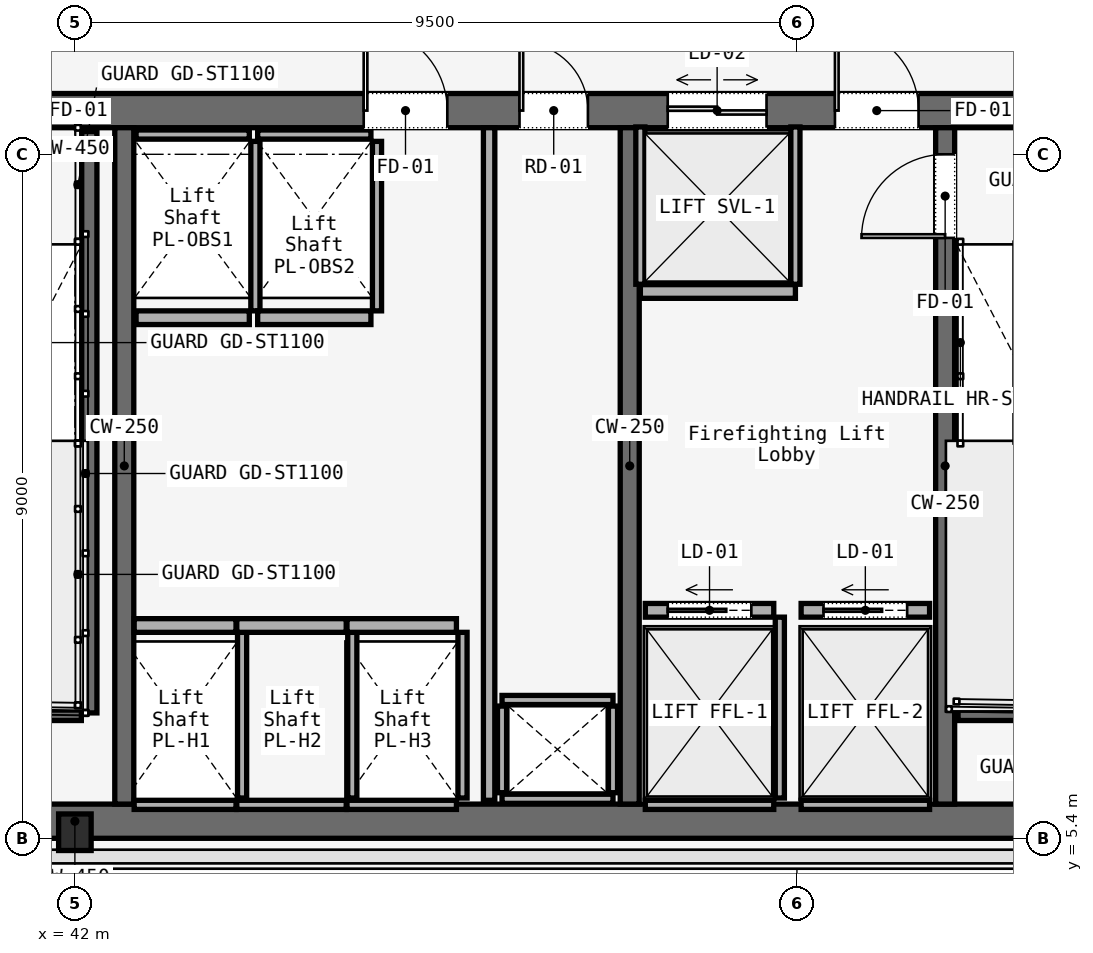
"""IFC4 building model, lengths in metres.
Left out: names, types, materials, properties, quantities, classifications, styles, units other than length and angle.
Written with IfcOpenShell. Run it as: python <this file> out.ifc"""

import sys

from ifc_helpers import new_model, si_unit, direction, frame, frame_2d, origin, origin_2d, place, context, subcontext, project, spatial, rectangle, i_section, extrude, element, fill, save


model = new_model("IFC4")
c1 = context("Model", 3, precision=1e-05, world=origin(), true_north=direction((0.0, 1.0)))
c2 = subcontext(c1, "Body", "Model", "MODEL_VIEW")
j1 = project(units=[si_unit("LENGTHUNIT", "METRE"), si_unit("PLANEANGLEUNIT", "RADIAN")], contexts=[c1])
p1 = place(None, origin())
s1 = spatial("IfcSite", under=j1, at=p1, CompositionType="ELEMENT")
p2 = place(p1, origin())
s2 = spatial("IfcBuilding", under=s1, at=p2, CompositionType="ELEMENT")
p3 = place(p2, frame((0.0, 0.0, 157.4)))
s3 = spatial("IfcBuildingStorey", under=s2, at=p3, CompositionType="ELEMENT", Elevation=157.4)
p4 = place(p3, frame((26.45, 14.975, 0.0), z_axis=(0.0, 0.0, 1.0), x_axis=(1.0, 0.0, 0.0)))
e1 = element("IfcWall", 1, at=p4, inside=s3, PredefinedType="SOLIDWALL", context=c2, shape_type="SweptSolid", body=[
    extrude(rectangle(XDim=31.1, YDim=0.45, at=frame_2d((15.55, 0.0))), origin(), (0.0, 0.0, 1.0), 3.58),
])
p5 = place(p4, frame((1.65, 0.0, 0.0)))
e2 = element("IfcOpeningElement", 2, at=p5, cuts=e1, PredefinedType="OPENING", context=c2, shape_type="SweptSolid", body=[
    extrude(rectangle(XDim=1.1, YDim=2.2, at=frame_2d((0.55, 1.1))), frame((0.0, 0.225, 0.0), z_axis=(0.0, -1.0, 0.0), x_axis=(1.0, 0.0, 0.0)), (0.0, 0.0, 1.0), 0.45),
])
p6 = place(p4, frame((13.65, 0.0, 0.0)))
e3 = element("IfcOpeningElement", 3, at=p6, cuts=e1, PredefinedType="OPENING", context=c2, shape_type="SweptSolid", body=[
    extrude(rectangle(XDim=1.1, YDim=2.2, at=frame_2d((0.55, 1.1))), frame((0.0, 0.225, 0.0), z_axis=(0.0, -1.0, 0.0), x_axis=(1.0, 0.0, 0.0)), (0.0, 0.0, 1.0), 0.45),
])
p7 = place(p4, frame((25.55, 0.0, 0.0)))
e4 = element("IfcOpeningElement", 4, at=p7, cuts=e1, PredefinedType="OPENING", context=c2, shape_type="SweptSolid", body=[
    extrude(rectangle(XDim=1.1, YDim=2.2, at=frame_2d((0.55, 1.1))), frame((0.0, 0.225, 0.0), z_axis=(0.0, -1.0, 0.0), x_axis=(1.0, 0.0, 0.0)), (0.0, 0.0, 1.0), 0.45),
])
p8 = place(p4, frame((10.7, 0.0, 0.0)))
e5 = element("IfcOpeningElement", 5, at=p8, cuts=e1, PredefinedType="OPENING", context=c2, shape_type="SweptSolid", body=[
    extrude(rectangle(XDim=1.4, YDim=2.2, at=frame_2d((0.7, 1.1))), frame((0.0, 0.225, 0.0), z_axis=(0.0, -1.0, 0.0), x_axis=(1.0, 0.0, 0.0)), (0.0, 0.0, 1.0), 0.45),
])
p9 = place(p4, frame((19.35, 0.0, 0.0)))
e6 = element("IfcOpeningElement", 6, at=p9, cuts=e1, PredefinedType="OPENING", context=c2, shape_type="SweptSolid", body=[
    extrude(rectangle(XDim=1.1, YDim=2.2, at=frame_2d((0.55, 1.1))), frame((0.0, 0.225, 0.0), z_axis=(0.0, -1.0, 0.0), x_axis=(1.0, 0.0, 0.0)), (0.0, 0.0, 1.0), 0.45),
])
p10 = place(p4, frame((21.4, 0.0, 0.0)))
e7 = element("IfcOpeningElement", 7, at=p10, cuts=e1, PredefinedType="OPENING", context=c2, shape_type="SweptSolid", body=[
    extrude(rectangle(XDim=0.9, YDim=2.1, at=frame_2d((0.45, 1.05))), frame((0.0, 0.225, 0.0), z_axis=(0.0, -1.0, 0.0), x_axis=(1.0, 0.0, 0.0)), (0.0, 0.0, 1.0), 0.45),
])
p11 = place(p4, frame((23.35, 0.0, 0.0)))
e8 = element("IfcOpeningElement", 8, at=p11, cuts=e1, PredefinedType="OPENING", context=c2, shape_type="SweptSolid", body=[
    extrude(rectangle(XDim=1.3, YDim=2.3, at=frame_2d((0.65, 1.15))), frame((0.0, 0.225, 0.0), z_axis=(0.0, -1.0, 0.0), x_axis=(1.0, 0.0, 0.0)), (0.0, 0.0, 1.0), 0.45),
])
p12 = place(p3, frame((26.45, 5.625, 0.0), z_axis=(0.0, 0.0, 1.0), x_axis=(1.0, 0.0, 0.0)))
e9 = element("IfcWall", 9, at=p12, inside=s3, PredefinedType="SOLIDWALL", context=c2, shape_type="SweptSolid", body=[
    extrude(rectangle(XDim=31.1, YDim=0.45, at=frame_2d((15.55, 0.0))), origin(), (0.0, 0.0, 1.0), 3.58),
])
for number, where, z_axis, x_axis in (
    (10, (42.65, 5.85, 0.0), (0.0, 0.0, 1.0), (0.0, 1.0, 0.0)),
    (11, (49.3, 5.85, 0.0), (0.0, 0.0, 1.0), (0.0, 1.0, 0.0)),
):
    element("IfcWall", number, at=place(p3, frame(where, z_axis=z_axis, x_axis=x_axis)), inside=s3, PredefinedType="SOLIDWALL", context=c2, shape_type="SweptSolid", body=[
        extrude(rectangle(XDim=8.9, YDim=0.25, at=frame_2d((4.45, 0.0))), origin(), (0.0, 0.0, 1.0), 3.58),
    ])
p13 = place(p3, frame((53.45, 5.85, 0.0), z_axis=(0.0, 0.0, 1.0), x_axis=(0.0, 1.0, 0.0)))
e12 = element("IfcWall", 12, at=p13, inside=s3, PredefinedType="SOLIDWALL", context=c2, shape_type="SweptSolid", body=[
    extrude(rectangle(XDim=8.9, YDim=0.25, at=frame_2d((4.45, 0.0))), origin(), (0.0, 0.0, 1.0), 3.58),
])
p14 = place(p13, frame((7.45, 0.0, 0.0)))
e13 = element("IfcOpeningElement", 13, at=p14, cuts=e12, PredefinedType="OPENING", context=c2, shape_type="SweptSolid", body=[
    extrude(rectangle(XDim=1.1, YDim=2.2, at=frame_2d((0.55, 1.1))), frame((0.0, 0.125, 0.0), z_axis=(0.0, -1.0, 0.0), x_axis=(1.0, 0.0, 0.0)), (0.0, 0.0, 1.0), 0.25),
])
p15 = place(p3, frame((42.0, 5.48, 0.0), z_axis=(0.0, 0.0, 1.0), x_axis=(1.0, 0.0, 0.0)))
e14 = element("IfcColumn", 14, at=p15, inside=s3, PredefinedType="COLUMN", context=c2, shape_type="SweptSolid", body=[
    extrude(i_section(OverallWidth=0.428, OverallDepth=0.481, WebThickness=0.051, FlangeThickness=0.065, FilletRadius=0.015, at=origin_2d()), origin(), (0.0, 0.0, 1.0), 3.58),
])
p16 = place(p3, frame((42.19, 14.7, 0.0), z_axis=(0.0, 0.0, 1.0), x_axis=(0.0, -1.0, 0.0)))
e15 = element("IfcWall", 15, at=p16, inside=s3, PredefinedType="SOLIDWALL", context=c2, shape_type="SweptSolid", body=[
    extrude(rectangle(XDim=7.65, YDim=0.2, at=frame_2d((3.825, 0.0))), origin(), (0.0, 0.0, 1.0), 3.8),
])
for number, where, z_axis, x_axis in (
    (16, (38.97, 7.05, 0.0), (0.0, 0.0, 1.0), (1.0, 0.0, 0.0)),
    (17, (53.62, 7.05, 0.0), (0.0, 0.0, 1.0), (1.0, 0.0, 0.0)),
):
    element("IfcWall", number, at=place(p3, frame(where, z_axis=z_axis, x_axis=x_axis)), inside=s3, PredefinedType="SOLIDWALL", context=c2, shape_type="SweptSolid", body=[
        extrude(rectangle(XDim=3.115, YDim=0.2, at=frame_2d((1.558, 0.0))), origin(), (0.0, 0.0, 1.0), 3.8),
    ])
for number, where, z_axis, x_axis in (
    (18, (47.62, 5.92, 0.0), (0.0, 0.0, 1.0), (1.0, 0.0, 0.0)),
    (19, (47.62, 7.22, 0.0), (0.0, 0.0, 1.0), (1.0, 0.0, 0.0)),
):
    element("IfcWall", number, at=place(p3, frame(where, z_axis=z_axis, x_axis=x_axis)), inside=s3, PredefinedType="SOLIDWALL", context=c2, shape_type="SweptSolid", body=[
        extrude(rectangle(XDim=1.46, YDim=0.12, at=frame_2d((0.73, 0.0))), origin(), (0.0, 0.0, 1.0), 3.01),
    ])
for number, where, z_axis, x_axis in (
    (20, (47.62, 6.0, 0.0), (0.0, 0.0, 1.0), (0.0, 1.0, 0.0)),
    (21, (49.08, 6.0, 0.0), (0.0, 0.0, 1.0), (0.0, 1.0, 0.0)),
):
    element("IfcWall", number, at=place(p3, frame(where, z_axis=z_axis, x_axis=x_axis)), inside=s3, PredefinedType="SOLIDWALL", context=c2, shape_type="SweptSolid", body=[
        extrude(rectangle(XDim=1.14, YDim=0.12, at=frame_2d((0.57, 0.0))), origin(), (0.0, 0.0, 1.0), 3.01),
    ])
p17 = place(p3, frame((47.45, 5.9, 0.0), z_axis=(0.0, 0.0, 1.0), x_axis=(0.0, 1.0, 0.0)))
e22 = element("IfcWall", 22, at=p17, inside=s3, PredefinedType="PARTITIONING", context=c2, shape_type="SweptSolid", body=[
    extrude(rectangle(XDim=8.85, YDim=0.15, at=frame_2d((4.425, 0.0))), origin(), (0.0, 0.0, 1.0), 3.01),
])
p18 = place(p3, frame((42.78, 8.2, 0.0), z_axis=(0.0, 0.0, 1.0), x_axis=(1.0, 0.0, 0.0)))
e23 = element("IfcWall", 23, at=p18, inside=s3, PredefinedType="SOLIDWALL", context=c2, shape_type="SweptSolid", body=[
    extrude(rectangle(XDim=1.34, YDim=0.18, at=frame_2d((0.67, 0.0))), origin(), (0.0, 0.0, 1.0), 3.01),
])
p19 = place(p3, frame((42.78, 5.84, 0.0), z_axis=(0.0, 0.0, 1.0), x_axis=(1.0, 0.0, 0.0)))
e24 = element("IfcWall", 24, at=p19, inside=s3, PredefinedType="SOLIDWALL", context=c2, shape_type="SweptSolid", body=[
    extrude(rectangle(XDim=1.34, YDim=0.12, at=frame_2d((0.67, 0.0))), origin(), (0.0, 0.0, 1.0), 3.01),
])
p20 = place(p3, frame((44.2, 5.93, 0.0), z_axis=(0.0, 0.0, 1.0), x_axis=(0.0, 1.0, 0.0)))
e25 = element("IfcWall", 25, at=p20, inside=s3, PredefinedType="SOLIDWALL", context=c2, shape_type="SweptSolid", body=[
    extrude(rectangle(XDim=2.18, YDim=0.12, at=frame_2d((1.09, 0.0))), origin(), (0.0, 0.0, 1.0), 3.01),
])
p21 = place(p3, frame((44.13, 8.2, 0.0), z_axis=(0.0, 0.0, 1.0), x_axis=(1.0, 0.0, 0.0)))
e26 = element("IfcWall", 26, at=p21, inside=s3, PredefinedType="SOLIDWALL", context=c2, shape_type="SweptSolid", body=[
    extrude(rectangle(XDim=1.44, YDim=0.18, at=frame_2d((0.72, 0.0))), origin(), (0.0, 0.0, 1.0), 3.01),
])
p22 = place(p3, frame((44.13, 5.84, 0.0), z_axis=(0.0, 0.0, 1.0), x_axis=(1.0, 0.0, 0.0)))
e27 = element("IfcWall", 27, at=p22, inside=s3, PredefinedType="SOLIDWALL", context=c2, shape_type="SweptSolid", body=[
    extrude(rectangle(XDim=1.44, YDim=0.12, at=frame_2d((0.72, 0.0))), origin(), (0.0, 0.0, 1.0), 3.01),
])
p23 = place(p3, frame((45.65, 5.93, 0.0), z_axis=(0.0, 0.0, 1.0), x_axis=(0.0, 1.0, 0.0)))
e28 = element("IfcWall", 28, at=p23, inside=s3, PredefinedType="SOLIDWALL", context=c2, shape_type="SweptSolid", body=[
    extrude(rectangle(XDim=2.18, YDim=0.12, at=frame_2d((1.09, 0.0))), origin(), (0.0, 0.0, 1.0), 3.01),
])
p24 = place(p3, frame((45.58, 8.2, 0.0), z_axis=(0.0, 0.0, 1.0), x_axis=(1.0, 0.0, 0.0)))
e29 = element("IfcWall", 29, at=p24, inside=s3, PredefinedType="SOLIDWALL", context=c2, shape_type="SweptSolid", body=[
    extrude(rectangle(XDim=1.44, YDim=0.18, at=frame_2d((0.72, 0.0))), origin(), (0.0, 0.0, 1.0), 3.01),
])
p25 = place(p3, frame((45.58, 5.84, 0.0), z_axis=(0.0, 0.0, 1.0), x_axis=(1.0, 0.0, 0.0)))
e30 = element("IfcWall", 30, at=p25, inside=s3, PredefinedType="SOLIDWALL", context=c2, shape_type="SweptSolid", body=[
    extrude(rectangle(XDim=1.44, YDim=0.12, at=frame_2d((0.72, 0.0))), origin(), (0.0, 0.0, 1.0), 3.01),
])
p26 = place(p3, frame((47.1, 5.93, 0.0), z_axis=(0.0, 0.0, 1.0), x_axis=(0.0, 1.0, 0.0)))
e31 = element("IfcWall", 31, at=p26, inside=s3, PredefinedType="SOLIDWALL", context=c2, shape_type="SweptSolid", body=[
    extrude(rectangle(XDim=2.18, YDim=0.12, at=frame_2d((1.09, 0.0))), origin(), (0.0, 0.0, 1.0), 3.01),
])
p27 = place(p3, frame((42.805, 12.25, 0.0), z_axis=(0.0, 0.0, 1.0), x_axis=(1.0, 0.0, 0.0)))
e32 = element("IfcWall", 32, at=p27, inside=s3, PredefinedType="SOLIDWALL", context=c2, shape_type="SweptSolid", body=[
    extrude(rectangle(XDim=1.49, YDim=0.18, at=frame_2d((0.745, 0.0))), origin(), (0.0, 0.0, 1.0), 3.01),
])
p28 = place(p3, frame((42.805, 14.66, 0.0), z_axis=(0.0, 0.0, 1.0), x_axis=(1.0, 0.0, 0.0)))
e33 = element("IfcWall", 33, at=p28, inside=s3, PredefinedType="SOLIDWALL", context=c2, shape_type="SweptSolid", body=[
    extrude(rectangle(XDim=1.49, YDim=0.12, at=frame_2d((0.745, 0.0))), origin(), (0.0, 0.0, 1.0), 3.01),
])
p29 = place(p3, frame((44.375, 12.34, 0.0), z_axis=(0.0, 0.0, 1.0), x_axis=(0.0, 1.0, 0.0)))
e34 = element("IfcWall", 34, at=p29, inside=s3, PredefinedType="SOLIDWALL", context=c2, shape_type="SweptSolid", body=[
    extrude(rectangle(XDim=2.23, YDim=0.12, at=frame_2d((1.115, 0.0))), origin(), (0.0, 0.0, 1.0), 3.01),
])
p30 = place(p3, frame((44.405, 12.25, 0.0), z_axis=(0.0, 0.0, 1.0), x_axis=(1.0, 0.0, 0.0)))
e35 = element("IfcWall", 35, at=p30, inside=s3, PredefinedType="SOLIDWALL", context=c2, shape_type="SweptSolid", body=[
    extrude(rectangle(XDim=1.49, YDim=0.18, at=frame_2d((0.745, 0.0))), origin(), (0.0, 0.0, 1.0), 3.01),
])
p31 = place(p3, frame((44.405, 14.66, 0.0), z_axis=(0.0, 0.0, 1.0), x_axis=(1.0, 0.0, 0.0)))
e36 = element("IfcWall", 36, at=p31, inside=s3, PredefinedType="SOLIDWALL", context=c2, shape_type="SweptSolid", body=[
    extrude(rectangle(XDim=1.49, YDim=0.12, at=frame_2d((0.745, 0.0))), origin(), (0.0, 0.0, 1.0), 3.01),
])
p32 = place(p3, frame((45.975, 12.34, 0.0), z_axis=(0.0, 0.0, 1.0), x_axis=(0.0, 1.0, 0.0)))
e37 = element("IfcWall", 37, at=p32, inside=s3, PredefinedType="SOLIDWALL", context=c2, shape_type="SweptSolid", body=[
    extrude(rectangle(XDim=2.23, YDim=0.12, at=frame_2d((1.115, 0.0))), origin(), (0.0, 0.0, 1.0), 3.01),
])
p33 = place(p3, frame((49.505, 8.4, 0.0), z_axis=(0.0, 0.0, 1.0), x_axis=(1.0, 0.0, 0.0)))
e38 = element("IfcWall", 38, at=p33, inside=s3, PredefinedType="SOLIDWALL", context=c2, shape_type="SweptSolid", body=[
    extrude(rectangle(XDim=1.69, YDim=0.18, at=frame_2d((0.845, 0.0))), origin(), (0.0, 0.0, 1.0), 3.01),
])
p34 = place(p33, frame((0.295, 0.0, 0.0)))
e39 = element("IfcOpeningElement", 39, at=p34, cuts=e38, PredefinedType="OPENING", context=c2, shape_type="SweptSolid", body=[
    extrude(rectangle(XDim=1.1, YDim=2.2, at=frame_2d((0.55, 1.1))), frame((0.0, 0.09, 0.0), z_axis=(0.0, -1.0, 0.0), x_axis=(1.0, 0.0, 0.0)), (0.0, 0.0, 1.0), 0.18),
])
p35 = place(p3, frame((49.505, 5.84, 0.0), z_axis=(0.0, 0.0, 1.0), x_axis=(1.0, 0.0, 0.0)))
e40 = element("IfcWall", 40, at=p35, inside=s3, PredefinedType="SOLIDWALL", context=c2, shape_type="SweptSolid", body=[
    extrude(rectangle(XDim=1.69, YDim=0.12, at=frame_2d((0.845, 0.0))), origin(), (0.0, 0.0, 1.0), 3.01),
])
p36 = place(p3, frame((51.275, 5.93, 0.0), z_axis=(0.0, 0.0, 1.0), x_axis=(0.0, 1.0, 0.0)))
e41 = element("IfcWall", 41, at=p36, inside=s3, PredefinedType="SOLIDWALL", context=c2, shape_type="SweptSolid", body=[
    extrude(rectangle(XDim=2.38, YDim=0.12, at=frame_2d((1.19, 0.0))), origin(), (0.0, 0.0, 1.0), 3.01),
])
p37 = place(p3, frame((51.555, 8.4, 0.0), z_axis=(0.0, 0.0, 1.0), x_axis=(1.0, 0.0, 0.0)))
e42 = element("IfcWall", 42, at=p37, inside=s3, PredefinedType="SOLIDWALL", context=c2, shape_type="SweptSolid", body=[
    extrude(rectangle(XDim=1.69, YDim=0.18, at=frame_2d((0.845, 0.0))), origin(), (0.0, 0.0, 1.0), 3.01),
])
p38 = place(p37, frame((0.295, 0.0, 0.0)))
e43 = element("IfcOpeningElement", 43, at=p38, cuts=e42, PredefinedType="OPENING", context=c2, shape_type="SweptSolid", body=[
    extrude(rectangle(XDim=1.1, YDim=2.2, at=frame_2d((0.55, 1.1))), frame((0.0, 0.09, 0.0), z_axis=(0.0, -1.0, 0.0), x_axis=(1.0, 0.0, 0.0)), (0.0, 0.0, 1.0), 0.18),
])
p39 = place(p3, frame((51.555, 5.84, 0.0), z_axis=(0.0, 0.0, 1.0), x_axis=(1.0, 0.0, 0.0)))
e44 = element("IfcWall", 44, at=p39, inside=s3, PredefinedType="SOLIDWALL", context=c2, shape_type="SweptSolid", body=[
    extrude(rectangle(XDim=1.69, YDim=0.12, at=frame_2d((0.845, 0.0))), origin(), (0.0, 0.0, 1.0), 3.01),
])
p40 = place(p3, frame((49.44, 12.595, 0.0), z_axis=(0.0, 0.0, 1.0), x_axis=(1.0, 0.0, 0.0)))
e45 = element("IfcWall", 45, at=p40, inside=s3, PredefinedType="SOLIDWALL", context=c2, shape_type="SweptSolid", body=[
    extrude(rectangle(XDim=2.04, YDim=0.18, at=frame_2d((1.02, 0.0))), origin(), (0.0, 0.0, 1.0), 3.01),
])
for number, where, z_axis, x_axis in (
    (46, (49.44, 12.69, 0.0), (0.0, 0.0, 1.0), (0.0, 1.0, 0.0)),
    (47, (51.48, 12.69, 0.0), (0.0, 0.0, 1.0), (0.0, 1.0, 0.0)),
):
    element("IfcWall", number, at=place(p3, frame(where, z_axis=z_axis, x_axis=x_axis)), inside=s3, PredefinedType="SOLIDWALL", context=c2, shape_type="SweptSolid", body=[
        extrude(rectangle(XDim=2.07, YDim=0.12, at=frame_2d((1.035, 0.0))), origin(), (0.0, 0.0, 1.0), 3.01),
    ])
p41 = place(p7, origin())
e48 = element("IfcDoor", 48, at=p41, inside=s3, OperationType="SINGLE_SWING_RIGHT", PredefinedType="DOOR", context=c2, shape_type="SweptSolid", body=[
    extrude(rectangle(XDim=1.1, YDim=2.2, at=frame_2d((0.55, 1.1))), frame((0.0, 0.025, 0.0), z_axis=(0.0, -1.0, 0.0), x_axis=(1.0, 0.0, 0.0)), (0.0, 0.0, 1.0), 0.05),
])
fill(e4, e48)
p42 = place(p9, origin())
e49 = element("IfcDoor", 49, at=p42, inside=s3, OperationType="SINGLE_SWING_LEFT", PredefinedType="DOOR", context=c2, shape_type="SweptSolid", body=[
    extrude(rectangle(XDim=1.1, YDim=2.2, at=frame_2d((0.55, 1.1))), frame((0.0, 0.025, 0.0), z_axis=(0.0, -1.0, 0.0), x_axis=(1.0, 0.0, 0.0)), (0.0, 0.0, 1.0), 0.05),
])
fill(e6, e49)
p43 = place(p10, origin())
e50 = element("IfcDoor", 50, at=p43, inside=s3, OperationType="SINGLE_SWING_LEFT", PredefinedType="DOOR", context=c2, shape_type="SweptSolid", body=[
    extrude(rectangle(XDim=0.9, YDim=2.1, at=frame_2d((0.45, 1.05))), frame((0.0, 0.025, 0.0), z_axis=(0.0, -1.0, 0.0), x_axis=(1.0, 0.0, 0.0)), (0.0, 0.0, 1.0), 0.05),
])
fill(e7, e50)
p44 = place(p14, origin())
e51 = element("IfcDoor", 51, at=p44, inside=s3, OperationType="SINGLE_SWING_LEFT", PredefinedType="DOOR", context=c2, shape_type="SweptSolid", body=[
    extrude(rectangle(XDim=1.1, YDim=2.2, at=frame_2d((0.55, 1.1))), frame((0.0, 0.025, 0.0), z_axis=(0.0, -1.0, 0.0), x_axis=(1.0, 0.0, 0.0)), (0.0, 0.0, 1.0), 0.05),
])
fill(e13, e51)
p45 = place(p34, origin())
e52 = element("IfcDoor", 52, at=p45, inside=s3, OperationType="SLIDING_TO_LEFT", PredefinedType="DOOR", context=c2, shape_type="SweptSolid", body=[
    extrude(rectangle(XDim=1.1, YDim=2.2, at=frame_2d((0.55, 1.1))), frame((0.0, 0.025, 0.0), z_axis=(0.0, -1.0, 0.0), x_axis=(1.0, 0.0, 0.0)), (0.0, 0.0, 1.0), 0.05),
])
fill(e39, e52)
p46 = place(p38, origin())
e53 = element("IfcDoor", 53, at=p46, inside=s3, OperationType="SLIDING_TO_LEFT", PredefinedType="DOOR", context=c2, shape_type="SweptSolid", body=[
    extrude(rectangle(XDim=1.1, YDim=2.2, at=frame_2d((0.55, 1.1))), frame((0.0, 0.025, 0.0), z_axis=(0.0, -1.0, 0.0), x_axis=(1.0, 0.0, 0.0)), (0.0, 0.0, 1.0), 0.05),
])
fill(e43, e53)
p47 = place(p11, origin())
e54 = element("IfcDoor", 54, at=p47, inside=s3, OperationType="DOUBLE_DOOR_SLIDING", PredefinedType="DOOR", context=c2, shape_type="SweptSolid", body=[
    extrude(rectangle(XDim=1.3, YDim=2.3, at=frame_2d((0.65, 1.15))), frame((0.0, 0.025, 0.0), z_axis=(0.0, -1.0, 0.0), x_axis=(1.0, 0.0, 0.0)), (0.0, 0.0, 1.0), 0.05),
])
fill(e8, e54)
save(model, sys.argv[1])
